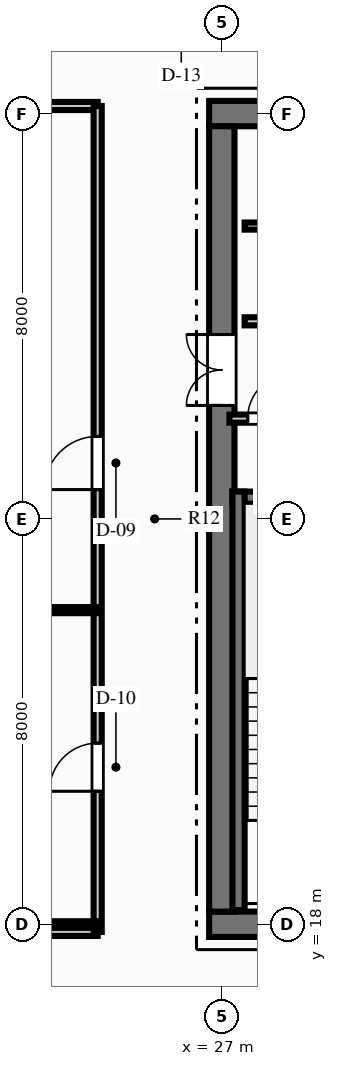
"""IFC4 building model, lengths in metres.
Left out: names, types, materials, properties, quantities, classifications, styles, units other than length and angle.
Written with IfcOpenShell. Run it as: python <this file> out.ifc"""

import sys

from ifc_helpers import new_model, si_unit, direction, frame, frame_2d, origin, place, context, subcontext, project, spatial, rectangle, extrude, element, fill, save


model = new_model("IFC4")
c1 = context("Model", 3, precision=1e-05, world=origin(), true_north=direction((0.0, 1.0)))
c2 = subcontext(c1, "Body", "Model", "MODEL_VIEW")
j1 = project(units=[si_unit("LENGTHUNIT", "METRE"), si_unit("PLANEANGLEUNIT", "RADIAN")], contexts=[c1])
p1 = place(None, origin())
s1 = spatial("IfcSite", under=j1, at=p1, CompositionType="ELEMENT")
p2 = place(p1, origin())
s2 = spatial("IfcBuilding", under=s1, at=p2, CompositionType="ELEMENT")
p3 = place(p2, frame((0.0, 0.0, 235.95)))
s3 = spatial("IfcBuildingStorey", under=s2, at=p3, CompositionType="ELEMENT", Elevation=235.95)
p4 = place(p3, frame((26.75, 18.0, 0.0), z_axis=(0.0, 0.0, 1.0), x_axis=(1.0, 0.0, 0.0)))
e1 = element("IfcWall", 1, at=p4, inside=s3, PredefinedType="SHEAR", context=c2, shape_type="SweptSolid", body=[
    extrude(rectangle(XDim=18.5, YDim=0.5, at=frame_2d((9.25, 0.0))), origin(), (0.0, 0.0, 1.0), 3.75),
])
p5 = place(p4, frame((7.35, 0.0, 0.0)))
e2 = element("IfcOpeningElement", 2, at=p5, cuts=e1, PredefinedType="OPENING", context=c2, shape_type="SweptSolid", body=[
    extrude(rectangle(XDim=1.1, YDim=2.15, at=frame_2d((0.55, 1.075))), frame((0.0, 0.26, 0.0), z_axis=(0.0, -1.0, 0.0), x_axis=(1.0, 0.0, 0.0)), (0.0, 0.0, 1.0), 0.52),
])
p6 = place(p4, frame((10.05, 0.0, 0.0)))
e3 = element("IfcOpeningElement", 3, at=p6, cuts=e1, PredefinedType="OPENING", context=c2, shape_type="SweptSolid", body=[
    extrude(rectangle(XDim=1.1, YDim=2.15, at=frame_2d((0.55, 1.075))), frame((0.0, 0.26, 0.0), z_axis=(0.0, -1.0, 0.0), x_axis=(1.0, 0.0, 0.0)), (0.0, 0.0, 1.0), 0.52),
])
p7 = place(p3, frame((26.75, 34.0, 0.0), z_axis=(0.0, 0.0, 1.0), x_axis=(1.0, 0.0, 0.0)))
e4 = element("IfcWall", 4, at=p7, inside=s3, PredefinedType="SHEAR", context=c2, shape_type="SweptSolid", body=[
    extrude(rectangle(XDim=18.5, YDim=0.5, at=frame_2d((9.25, 0.0))), origin(), (0.0, 0.0, 1.0), 3.75),
])
p8 = place(p7, frame((13.935, 0.0, 0.0)))
e5 = element("IfcOpeningElement", 5, at=p8, cuts=e4, PredefinedType="OPENING", context=c2, shape_type="SweptSolid", body=[
    extrude(rectangle(XDim=1.1, YDim=2.15, at=frame_2d((0.55, 1.075))), frame((0.0, 0.26, 0.0), z_axis=(0.0, -1.0, 0.0), x_axis=(1.0, 0.0, 0.0)), (0.0, 0.0, 1.0), 0.52),
])
p9 = place(p7, frame((16.185, 0.0, 0.0)))
e6 = element("IfcOpeningElement", 6, at=p9, cuts=e4, PredefinedType="OPENING", context=c2, shape_type="SweptSolid", body=[
    extrude(rectangle(XDim=1.1, YDim=2.15, at=frame_2d((0.55, 1.075))), frame((0.0, 0.26, 0.0), z_axis=(0.0, -1.0, 0.0), x_axis=(1.0, 0.0, 0.0)), (0.0, 0.0, 1.0), 0.52),
])
p10 = place(p3, frame((27.0, 18.25, 0.0), z_axis=(0.0, 0.0, 1.0), x_axis=(0.0, 1.0, 0.0)))
e7 = element("IfcWall", 7, at=p10, inside=s3, PredefinedType="SHEAR", context=c2, shape_type="SweptSolid", body=[
    extrude(rectangle(XDim=15.5, YDim=0.5, at=frame_2d((7.75, 0.0))), origin(), (0.0, 0.0, 1.0), 3.75),
])
p11 = place(p10, frame((9.99, 0.0, 0.0)))
e8 = element("IfcOpeningElement", 8, at=p11, cuts=e7, PredefinedType="OPENING", context=c2, shape_type="SweptSolid", body=[
    extrude(rectangle(XDim=1.4, YDim=2.2, at=frame_2d((0.7, 1.1))), frame((0.0, 0.26, 0.0), z_axis=(0.0, -1.0, 0.0), x_axis=(1.0, 0.0, 0.0)), (0.0, 0.0, 1.0), 0.52),
])
p12 = place(p3, frame((27.21, 26.42, 0.0), z_axis=(0.0, 0.0, 1.0), x_axis=(1.0, 0.0, 0.0)))
e9 = element("IfcWall", 9, at=p12, inside=s3, PredefinedType="SHEAR", context=c2, shape_type="SweptSolid", body=[
    extrude(rectangle(XDim=3.98, YDim=0.24, at=frame_2d((1.99, 0.0))), origin(), (0.0, 0.0, 1.0), 3.75),
])
p13 = place(p3, frame((27.33, 18.28, 0.0), z_axis=(0.0, 0.0, 1.0), x_axis=(0.0, 1.0, 0.0)))
e10 = element("IfcWall", 10, at=p13, inside=s3, PredefinedType="SHEAR", context=c2, shape_type="SweptSolid", body=[
    extrude(rectangle(XDim=8.26, YDim=0.24, at=frame_2d((4.13, 0.0))), origin(), (0.0, 0.0, 1.0), 3.75),
])
p14 = place(p3, frame((27.15, 27.98, 0.0), z_axis=(0.0, 0.0, 1.0), x_axis=(1.0, 0.0, 0.0)))
e11 = element("IfcWall", 11, at=p14, inside=s3, PredefinedType="PARTITIONING", context=c2, shape_type="SweptSolid", body=[
    extrude(rectangle(XDim=4.05, YDim=0.16, at=frame_2d((2.025, 0.0))), origin(), (0.0, 0.0, 1.0), 3.4),
])
p15 = place(p14, frame((0.36, 0.0, 0.0)))
e12 = element("IfcOpeningElement", 12, at=p15, cuts=e11, PredefinedType="OPENING", context=c2, shape_type="SweptSolid", body=[
    extrude(rectangle(XDim=0.9, YDim=2.15, at=frame_2d((0.45, 1.075))), frame((0.0, 0.09, 0.0), z_axis=(0.0, -1.0, 0.0), x_axis=(1.0, 0.0, 0.0)), (0.0, 0.0, 1.0), 0.18),
])
p16 = place(p14, frame((1.63, 0.0, 0.0)))
e13 = element("IfcOpeningElement", 13, at=p16, cuts=e11, PredefinedType="OPENING", context=c2, shape_type="SweptSolid", body=[
    extrude(rectangle(XDim=0.9, YDim=2.15, at=frame_2d((0.45, 1.075))), frame((0.0, 0.09, 0.0), z_axis=(0.0, -1.0, 0.0), x_axis=(1.0, 0.0, 0.0)), (0.0, 0.0, 1.0), 0.18),
])
p17 = place(p14, frame((2.788, 0.0, 0.0)))
e14 = element("IfcOpeningElement", 14, at=p17, cuts=e11, PredefinedType="OPENING", context=c2, shape_type="SweptSolid", body=[
    extrude(rectangle(XDim=0.9, YDim=2.15, at=frame_2d((0.45, 1.075))), frame((0.0, 0.09, 0.0), z_axis=(0.0, -1.0, 0.0), x_axis=(1.0, 0.0, 0.0)), (0.0, 0.0, 1.0), 0.18),
])
p18 = place(p3, frame((27.45, 29.9, 0.0), z_axis=(0.0, 0.0, 1.0), x_axis=(1.0, 0.0, 0.0)))
e15 = element("IfcWall", 15, at=p18, inside=s3, PredefinedType="PARTITIONING", context=c2, shape_type="SweptSolid", body=[
    extrude(rectangle(XDim=4.43, YDim=0.16, at=frame_2d((2.215, 0.0))), origin(), (0.0, 0.0, 1.0), 3.4),
])
p19 = place(p18, frame((1.675, 0.0, 0.0)))
e16 = element("IfcOpeningElement", 16, at=p19, cuts=e15, PredefinedType="OPENING", context=c2, shape_type="SweptSolid", body=[
    extrude(rectangle(XDim=0.95, YDim=2.15, at=frame_2d((0.475, 1.075))), frame((0.0, 0.09, 0.0), z_axis=(0.0, -1.0, 0.0), x_axis=(1.0, 0.0, 0.0)), (0.0, 0.0, 1.0), 0.18),
])
p20 = place(p3, frame((27.45, 31.78, 0.0), z_axis=(0.0, 0.0, 1.0), x_axis=(1.0, 0.0, 0.0)))
e17 = element("IfcWall", 17, at=p20, inside=s3, PredefinedType="PARTITIONING", context=c2, shape_type="SweptSolid", body=[
    extrude(rectangle(XDim=4.35, YDim=0.14, at=frame_2d((2.175, 0.0))), origin(), (0.0, 0.0, 1.0), 3.4),
])
p21 = place(p20, frame((1.7, 0.0, 0.0)))
e18 = element("IfcOpeningElement", 18, at=p21, cuts=e17, PredefinedType="OPENING", context=c2, shape_type="SweptSolid", body=[
    extrude(rectangle(XDim=0.9, YDim=2.15, at=frame_2d((0.45, 1.075))), frame((0.0, 0.08, 0.0), z_axis=(0.0, -1.0, 0.0), x_axis=(1.0, 0.0, 0.0)), (0.0, 0.0, 1.0), 0.16),
])
for number, where, z_axis, x_axis in (
    (19, (18.2, 17.85, 0.0), (0.0, 0.0, 1.0), (1.0, 0.0, 0.0)),
    (20, (18.2, 34.15, 0.0), (0.0, 0.0, 1.0), (1.0, 0.0, 0.0)),
):
    element("IfcWall", number, at=place(p3, frame(where, z_axis=z_axis, x_axis=x_axis)), inside=s3, PredefinedType="PARTITIONING", context=c2, shape_type="SweptSolid", body=[
        extrude(rectangle(XDim=6.35, YDim=0.16, at=frame_2d((3.175, 0.0))), origin(), (0.0, 0.0, 1.0), 3.4),
    ])
p22 = place(p3, frame((24.55, 17.85, 0.0), z_axis=(0.0, 0.0, 1.0), x_axis=(0.0, 1.0, 0.0)))
e21 = element("IfcWall", 21, at=p22, inside=s3, PredefinedType="PARTITIONING", context=c2, shape_type="SweptSolid", body=[
    extrude(rectangle(XDim=16.3, YDim=0.16, at=frame_2d((8.15, 0.0))), origin(), (0.0, 0.0, 1.0), 3.4),
])
p23 = place(p22, frame((2.775, 0.0, 0.0)))
e22 = element("IfcOpeningElement", 22, at=p23, cuts=e21, PredefinedType="OPENING", context=c2, shape_type="SweptSolid", body=[
    extrude(rectangle(XDim=0.95, YDim=2.15, at=frame_2d((0.475, 1.075))), frame((0.0, 0.09, 0.0), z_axis=(0.0, -1.0, 0.0), x_axis=(1.0, 0.0, 0.0)), (0.0, 0.0, 1.0), 0.18),
])
p24 = place(p22, frame((8.729, 0.0, 0.0)))
e23 = element("IfcOpeningElement", 23, at=p24, cuts=e21, PredefinedType="OPENING", context=c2, shape_type="SweptSolid", body=[
    extrude(rectangle(XDim=1.05, YDim=2.15, at=frame_2d((0.525, 1.075))), frame((0.0, 0.09, 0.0), z_axis=(0.0, -1.0, 0.0), x_axis=(1.0, 0.0, 0.0)), (0.0, 0.0, 1.0), 0.18),
])
for number, where, z_axis, x_axis in (
    (24, (20.2, 18.0, 0.0), (0.0, 0.0, 1.0), (1.0, 0.0, 0.0)),
    (25, (20.2, 24.2, 0.0), (0.0, 0.0, 1.0), (1.0, 0.0, 0.0)),
):
    element("IfcWall", number, at=place(p3, frame(where, z_axis=z_axis, x_axis=x_axis)), inside=s3, PredefinedType="PARTITIONING", context=c2, shape_type="SweptSolid", body=[
        extrude(rectangle(XDim=4.35, YDim=0.12, at=frame_2d((2.175, 0.0))), origin(), (0.0, 0.0, 1.0), 3.4),
    ])
p25 = place(p15, origin())
e26 = element("IfcDoor", 26, at=p25, inside=s3, OperationType="SINGLE_SWING_RIGHT", PredefinedType="DOOR", context=c2, shape_type="SweptSolid", body=[
    extrude(rectangle(XDim=0.9, YDim=2.15, at=frame_2d((0.45, 1.075))), frame((0.0, 0.025, 0.0), z_axis=(0.0, -1.0, 0.0), x_axis=(1.0, 0.0, 0.0)), (0.0, 0.0, 1.0), 0.05),
])
fill(e12, e26)
p26 = place(p11, origin())
e27 = element("IfcDoor", 27, at=p26, inside=s3, OperationType="DOUBLE_DOOR_SINGLE_SWING", PredefinedType="DOOR", context=c2, shape_type="SweptSolid", body=[
    extrude(rectangle(XDim=1.4, YDim=2.2, at=frame_2d((0.7, 1.1))), frame((0.0, 0.025, 0.0), z_axis=(0.0, -1.0, 0.0), x_axis=(1.0, 0.0, 0.0)), (0.0, 0.0, 1.0), 0.05),
])
fill(e8, e27)
p27 = place(p23, origin())
e28 = element("IfcDoor", 28, at=p27, inside=s3, OperationType="SINGLE_SWING_LEFT", PredefinedType="DOOR", context=c2, shape_type="SweptSolid", body=[
    extrude(rectangle(XDim=0.95, YDim=2.15, at=frame_2d((0.475, 1.075))), frame((0.0, 0.025, 0.0), z_axis=(0.0, -1.0, 0.0), x_axis=(1.0, 0.0, 0.0)), (0.0, 0.0, 1.0), 0.05),
])
fill(e22, e28)
p28 = place(p24, origin())
e29 = element("IfcDoor", 29, at=p28, inside=s3, OperationType="SINGLE_SWING_LEFT", PredefinedType="DOOR", context=c2, shape_type="SweptSolid", body=[
    extrude(rectangle(XDim=1.05, YDim=2.15, at=frame_2d((0.525, 1.075))), frame((0.0, 0.025, 0.0), z_axis=(0.0, -1.0, 0.0), x_axis=(1.0, 0.0, 0.0)), (0.0, 0.0, 1.0), 0.05),
])
fill(e23, e29)
save(model, sys.argv[1])
